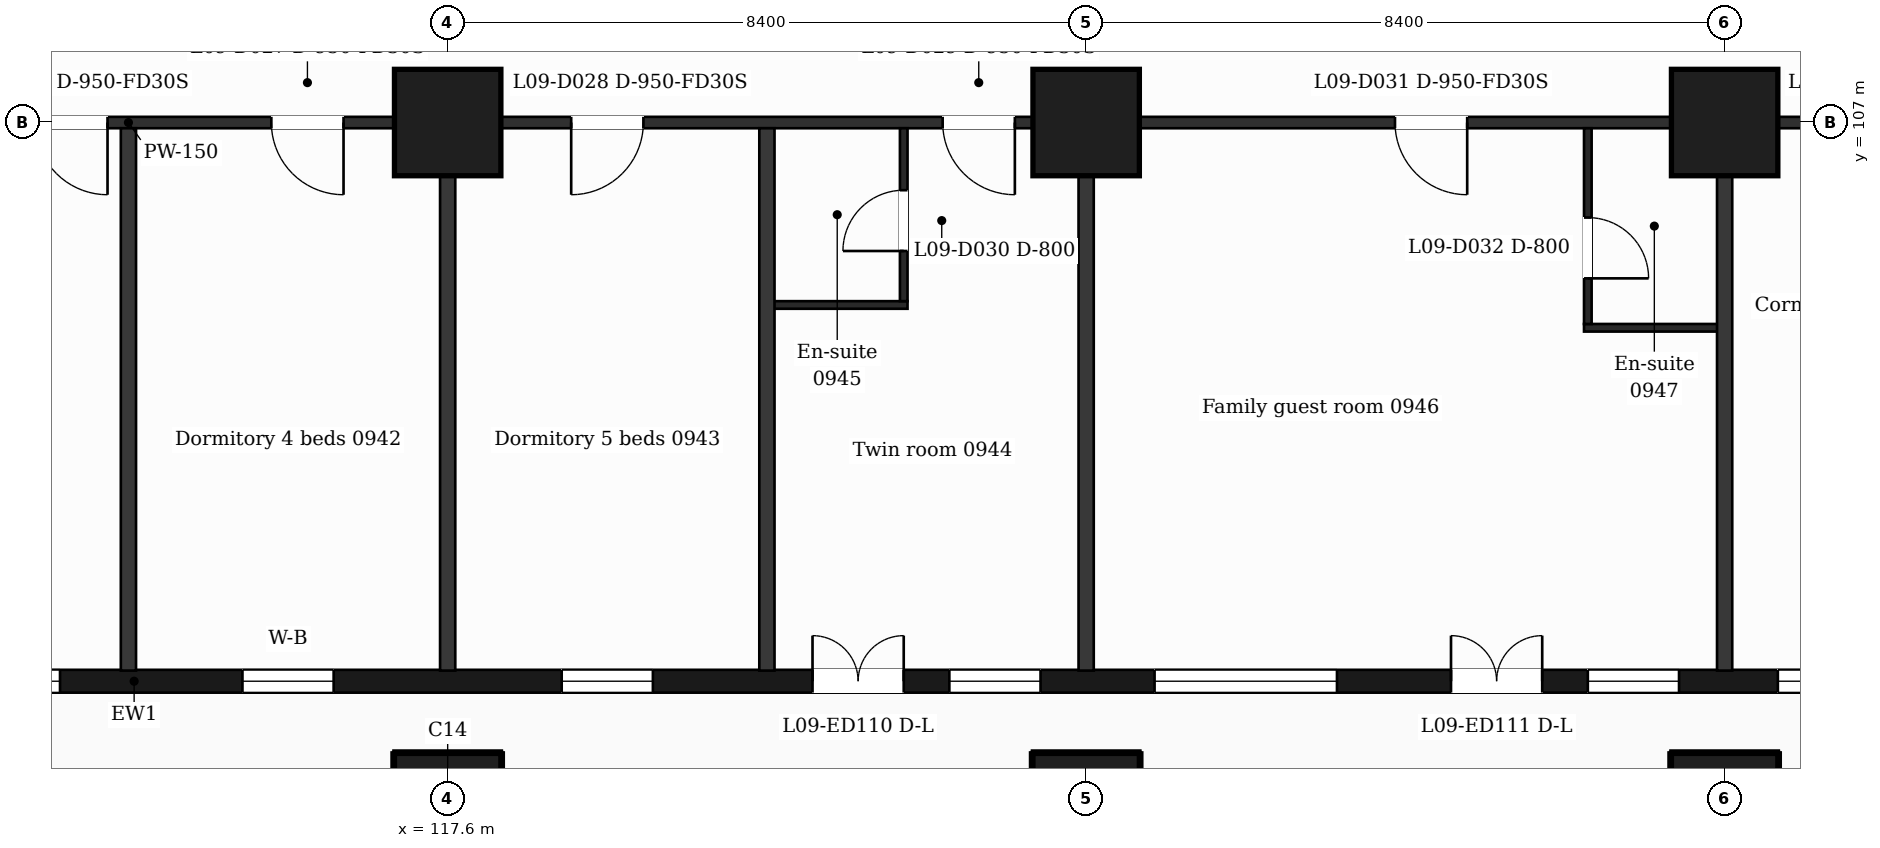
"""IFC4 building model, lengths in metres.
Left out: names, types, materials, properties, quantities, classifications, styles, units other than length and angle.
Written with IfcOpenShell. Run it as: python <this file> out.ifc"""

import sys

from ifc_helpers import new_model, si_unit, direction, frame, frame_2d, origin, origin_2d, place, context, subcontext, project, spatial, rectangle, extrude, element, fill, save


model = new_model("IFC4")
c1 = context("Model", 3, precision=1e-05, world=origin(), true_north=direction((0.0, 1.0)))
c2 = subcontext(c1, "Body", "Model", "MODEL_VIEW")
j1 = project(units=[si_unit("LENGTHUNIT", "METRE"), si_unit("PLANEANGLEUNIT", "RADIAN")], contexts=[c1])
p1 = place(None, origin())
s1 = spatial("IfcSite", under=j1, at=p1, CompositionType="ELEMENT")
p2 = place(p1, origin())
s2 = spatial("IfcBuilding", under=s1, at=p2, CompositionType="ELEMENT")
p3 = place(p2, frame((0.0, 0.0, 49.5)))
s3 = spatial("IfcBuildingStorey", under=s2, at=p3, CompositionType="ELEMENT", Elevation=49.5)
for number, where, z_axis, x_axis in (
    (1, (117.6, 98.0, 0.0), (0.0, 0.0, 1.0), (1.0, 0.0, 0.0)),
    (2, (126.0, 98.0, 0.0), (0.0, 0.0, 1.0), (1.0, 0.0, 0.0)),
    (3, (134.4, 98.0, 0.0), (0.0, 0.0, 1.0), (1.0, 0.0, 0.0)),
    (4, (117.6, 107.0, 0.0), (0.0, 0.0, 1.0), (1.0, 0.0, 0.0)),
    (5, (126.0, 107.0, 0.0), (0.0, 0.0, 1.0), (1.0, 0.0, 0.0)),
    (6, (134.4, 107.0, 0.0), (0.0, 0.0, 1.0), (1.0, 0.0, 0.0)),
):
    element("IfcColumn", number, at=place(p3, frame(where, z_axis=z_axis, x_axis=x_axis)), inside=s3, PredefinedType="COLUMN", context=c2, shape_type="SweptSolid", body=[
        extrude(rectangle(XDim=1.4, YDim=1.4, at=origin_2d()), origin(), (0.0, 0.0, 1.0), 3.5),
    ])
p4 = place(p3, frame((89.85, 99.65, 0.0), z_axis=(0.0, 0.0, 1.0), x_axis=(1.0, 0.0, 0.0)))
e7 = element("IfcWall", 7, at=p4, inside=s3, PredefinedType="SOLIDWALL", context=c2, shape_type="SweptSolid", body=[
    extrude(rectangle(XDim=47.25, YDim=0.3, at=frame_2d((23.625, 0.0))), origin(), (0.0, 0.0, 1.0), 3.18),
])
p5 = place(p4, frame((0.725, 0.0, 0.9)))
e8 = element("IfcOpeningElement", 8, at=p5, cuts=e7, PredefinedType="OPENING", context=c2, shape_type="SweptSolid", body=[
    extrude(rectangle(XDim=1.2, YDim=2.1, at=frame_2d((0.6, 1.05))), frame((0.0, 0.16, 0.0), z_axis=(0.0, -1.0, 0.0), x_axis=(1.0, 0.0, 0.0)), (0.0, 0.0, 1.0), 0.32),
])
p6 = place(p4, frame((3.45, 0.0, 0.9)))
e9 = element("IfcOpeningElement", 9, at=p6, cuts=e7, PredefinedType="OPENING", context=c2, shape_type="SweptSolid", body=[
    extrude(rectangle(XDim=2.4, YDim=2.1, at=frame_2d((1.2, 1.05))), frame((0.0, 0.16, 0.0), z_axis=(0.0, -1.0, 0.0), x_axis=(1.0, 0.0, 0.0)), (0.0, 0.0, 1.0), 0.32),
])
p7 = place(p4, frame((7.65, 0.0, 0.9)))
e10 = element("IfcOpeningElement", 10, at=p7, cuts=e7, PredefinedType="OPENING", context=c2, shape_type="SweptSolid", body=[
    extrude(rectangle(XDim=2.4, YDim=2.1, at=frame_2d((1.2, 1.05))), frame((0.0, 0.16, 0.0), z_axis=(0.0, -1.0, 0.0), x_axis=(1.0, 0.0, 0.0)), (0.0, 0.0, 1.0), 0.32),
])
p8 = place(p4, frame((11.85, 0.0, 0.9)))
e11 = element("IfcOpeningElement", 11, at=p8, cuts=e7, PredefinedType="OPENING", context=c2, shape_type="SweptSolid", body=[
    extrude(rectangle(XDim=2.4, YDim=2.1, at=frame_2d((1.2, 1.05))), frame((0.0, 0.16, 0.0), z_axis=(0.0, -1.0, 0.0), x_axis=(1.0, 0.0, 0.0)), (0.0, 0.0, 1.0), 0.32),
])
p9 = place(p4, frame((16.05, 0.0, 0.9)))
e12 = element("IfcOpeningElement", 12, at=p9, cuts=e7, PredefinedType="OPENING", context=c2, shape_type="SweptSolid", body=[
    extrude(rectangle(XDim=2.4, YDim=2.1, at=frame_2d((1.2, 1.05))), frame((0.0, 0.16, 0.0), z_axis=(0.0, -1.0, 0.0), x_axis=(1.0, 0.0, 0.0)), (0.0, 0.0, 1.0), 0.32),
])
p10 = place(p4, frame((20.25, 0.0, 0.9)))
e13 = element("IfcOpeningElement", 13, at=p10, cuts=e7, PredefinedType="OPENING", context=c2, shape_type="SweptSolid", body=[
    extrude(rectangle(XDim=2.4, YDim=2.1, at=frame_2d((1.2, 1.05))), frame((0.0, 0.16, 0.0), z_axis=(0.0, -1.0, 0.0), x_axis=(1.0, 0.0, 0.0)), (0.0, 0.0, 1.0), 0.32),
])
p11 = place(p4, frame((25.05, 0.0, 0.9)))
e14 = element("IfcOpeningElement", 14, at=p11, cuts=e7, PredefinedType="OPENING", context=c2, shape_type="SweptSolid", body=[
    extrude(rectangle(XDim=1.2, YDim=2.1, at=frame_2d((0.6, 1.05))), frame((0.0, 0.16, 0.0), z_axis=(0.0, -1.0, 0.0), x_axis=(1.0, 0.0, 0.0)), (0.0, 0.0, 1.0), 0.32),
])
p12 = place(p4, frame((29.25, 0.0, 0.9)))
e15 = element("IfcOpeningElement", 15, at=p12, cuts=e7, PredefinedType="OPENING", context=c2, shape_type="SweptSolid", body=[
    extrude(rectangle(XDim=1.2, YDim=2.1, at=frame_2d((0.6, 1.05))), frame((0.0, 0.16, 0.0), z_axis=(0.0, -1.0, 0.0), x_axis=(1.0, 0.0, 0.0)), (0.0, 0.0, 1.0), 0.32),
])
p13 = place(p4, frame((32.55, 0.0, 0.0)))
e16 = element("IfcOpeningElement", 16, at=p13, cuts=e7, PredefinedType="OPENING", context=c2, shape_type="SweptSolid", body=[
    extrude(rectangle(XDim=1.2, YDim=2.4, at=frame_2d((0.6, 1.2))), frame((0.0, 0.16, 0.0), z_axis=(0.0, -1.0, 0.0), x_axis=(1.0, 0.0, 0.0)), (0.0, 0.0, 1.0), 0.32),
])
p14 = place(p4, frame((34.35, 0.0, 0.9)))
e17 = element("IfcOpeningElement", 17, at=p14, cuts=e7, PredefinedType="OPENING", context=c2, shape_type="SweptSolid", body=[
    extrude(rectangle(XDim=1.2, YDim=2.1, at=frame_2d((0.6, 1.05))), frame((0.0, 0.16, 0.0), z_axis=(0.0, -1.0, 0.0), x_axis=(1.0, 0.0, 0.0)), (0.0, 0.0, 1.0), 0.32),
])
p15 = place(p4, frame((37.05, 0.0, 0.9)))
e18 = element("IfcOpeningElement", 18, at=p15, cuts=e7, PredefinedType="OPENING", context=c2, shape_type="SweptSolid", body=[
    extrude(rectangle(XDim=2.4, YDim=2.1, at=frame_2d((1.2, 1.05))), frame((0.0, 0.16, 0.0), z_axis=(0.0, -1.0, 0.0), x_axis=(1.0, 0.0, 0.0)), (0.0, 0.0, 1.0), 0.32),
])
p16 = place(p4, frame((40.95, 0.0, 0.0)))
e19 = element("IfcOpeningElement", 19, at=p16, cuts=e7, PredefinedType="OPENING", context=c2, shape_type="SweptSolid", body=[
    extrude(rectangle(XDim=1.2, YDim=2.4, at=frame_2d((0.6, 1.2))), frame((0.0, 0.16, 0.0), z_axis=(0.0, -1.0, 0.0), x_axis=(1.0, 0.0, 0.0)), (0.0, 0.0, 1.0), 0.32),
])
p17 = place(p4, frame((42.75, 0.0, 0.9)))
e20 = element("IfcOpeningElement", 20, at=p17, cuts=e7, PredefinedType="OPENING", context=c2, shape_type="SweptSolid", body=[
    extrude(rectangle(XDim=1.2, YDim=2.1, at=frame_2d((0.6, 1.05))), frame((0.0, 0.16, 0.0), z_axis=(0.0, -1.0, 0.0), x_axis=(1.0, 0.0, 0.0)), (0.0, 0.0, 1.0), 0.32),
])
p18 = place(p4, frame((45.25, 0.0, 0.9)))
e21 = element("IfcOpeningElement", 21, at=p18, cuts=e7, PredefinedType="OPENING", context=c2, shape_type="SweptSolid", body=[
    extrude(rectangle(XDim=1.2, YDim=2.1, at=frame_2d((0.6, 1.05))), frame((0.0, 0.16, 0.0), z_axis=(0.0, -1.0, 0.0), x_axis=(1.0, 0.0, 0.0)), (0.0, 0.0, 1.0), 0.32),
])
for number, where, z_axis, x_axis in (
    (22, (132.55, 104.3, 0.0), (0.0, 0.0, 1.0), (1.0, 0.0, 0.0)),
    (23, (121.8, 104.6, 0.0), (0.0, 0.0, 1.0), (1.0, 0.0, 0.0)),
):
    element("IfcWall", number, at=place(p3, frame(where, z_axis=z_axis, x_axis=x_axis)), inside=s3, PredefinedType="PARTITIONING", context=c2, shape_type="SweptSolid", body=[
        extrude(rectangle(XDim=1.85, YDim=0.1, at=frame_2d((0.925, 0.0))), origin(), (0.0, 0.0, 1.0), 3.18),
    ])
p19 = place(p3, frame((87.018, 107.0, 0.0), z_axis=(0.0, 0.0, 1.0), x_axis=(1.0, 0.0, 0.0)))
e24 = element("IfcWall", 24, at=p19, inside=s3, PredefinedType="PARTITIONING", context=c2, shape_type="SweptSolid", body=[
    extrude(rectangle(XDim=52.765, YDim=0.15, at=frame_2d((26.382, 0.0))), origin(), (0.0, 0.0, 1.0), 3.18),
])
p20 = place(p19, frame((0.87, 0.0, 0.0)))
e25 = element("IfcOpeningElement", 25, at=p20, cuts=e24, PredefinedType="OPENING", context=c2, shape_type="SweptSolid", body=[
    extrude(rectangle(XDim=0.95, YDim=2.1, at=frame_2d((0.475, 1.05))), frame((0.0, 0.085, 0.0), z_axis=(0.0, -1.0, 0.0), x_axis=(1.0, 0.0, 0.0)), (0.0, 0.0, 1.0), 0.17),
])
p21 = place(p19, frame((6.752, 0.0, 0.0)))
e26 = element("IfcOpeningElement", 26, at=p21, cuts=e24, PredefinedType="OPENING", context=c2, shape_type="SweptSolid", body=[
    extrude(rectangle(XDim=0.95, YDim=2.1, at=frame_2d((0.475, 1.05))), frame((0.0, 0.085, 0.0), z_axis=(0.0, -1.0, 0.0), x_axis=(1.0, 0.0, 0.0)), (0.0, 0.0, 1.0), 0.17),
])
p22 = place(p19, frame((9.857, 0.0, 0.0)))
e27 = element("IfcOpeningElement", 27, at=p22, cuts=e24, PredefinedType="OPENING", context=c2, shape_type="SweptSolid", body=[
    extrude(rectangle(XDim=0.95, YDim=2.1, at=frame_2d((0.475, 1.05))), frame((0.0, 0.085, 0.0), z_axis=(0.0, -1.0, 0.0), x_axis=(1.0, 0.0, 0.0)), (0.0, 0.0, 1.0), 0.17),
])
p23 = place(p19, frame((14.682, 0.0, 0.0)))
e28 = element("IfcOpeningElement", 28, at=p23, cuts=e24, PredefinedType="OPENING", context=c2, shape_type="SweptSolid", body=[
    extrude(rectangle(XDim=0.95, YDim=2.1, at=frame_2d((0.475, 1.05))), frame((0.0, 0.085, 0.0), z_axis=(0.0, -1.0, 0.0), x_axis=(1.0, 0.0, 0.0)), (0.0, 0.0, 1.0), 0.17),
])
p24 = place(p19, frame((19.862, 0.0, 0.0)))
e29 = element("IfcOpeningElement", 29, at=p24, cuts=e24, PredefinedType="OPENING", context=c2, shape_type="SweptSolid", body=[
    extrude(rectangle(XDim=0.95, YDim=2.1, at=frame_2d((0.475, 1.05))), frame((0.0, 0.085, 0.0), z_axis=(0.0, -1.0, 0.0), x_axis=(1.0, 0.0, 0.0)), (0.0, 0.0, 1.0), 0.17),
])
p25 = place(p19, frame((25.157, 0.0, 0.0)))
e30 = element("IfcOpeningElement", 30, at=p25, cuts=e24, PredefinedType="OPENING", context=c2, shape_type="SweptSolid", body=[
    extrude(rectangle(XDim=0.95, YDim=2.1, at=frame_2d((0.475, 1.05))), frame((0.0, 0.085, 0.0), z_axis=(0.0, -1.0, 0.0), x_axis=(1.0, 0.0, 0.0)), (0.0, 0.0, 1.0), 0.17),
])
p26 = place(p19, frame((28.262, 0.0, 0.0)))
e31 = element("IfcOpeningElement", 31, at=p26, cuts=e24, PredefinedType="OPENING", context=c2, shape_type="SweptSolid", body=[
    extrude(rectangle(XDim=0.95, YDim=2.1, at=frame_2d((0.475, 1.05))), frame((0.0, 0.085, 0.0), z_axis=(0.0, -1.0, 0.0), x_axis=(1.0, 0.0, 0.0)), (0.0, 0.0, 1.0), 0.17),
])
p27 = place(p19, frame((32.207, 0.0, 0.0)))
e32 = element("IfcOpeningElement", 32, at=p27, cuts=e24, PredefinedType="OPENING", context=c2, shape_type="SweptSolid", body=[
    extrude(rectangle(XDim=0.95, YDim=2.1, at=frame_2d((0.475, 1.05))), frame((0.0, 0.085, 0.0), z_axis=(0.0, -1.0, 0.0), x_axis=(1.0, 0.0, 0.0)), (0.0, 0.0, 1.0), 0.17),
])
p28 = place(p19, frame((37.094, 0.0, 0.0)))
e33 = element("IfcOpeningElement", 33, at=p28, cuts=e24, PredefinedType="OPENING", context=c2, shape_type="SweptSolid", body=[
    extrude(rectangle(XDim=0.95, YDim=2.1, at=frame_2d((0.475, 1.05))), frame((0.0, 0.085, 0.0), z_axis=(0.0, -1.0, 0.0), x_axis=(1.0, 0.0, 0.0)), (0.0, 0.0, 1.0), 0.17),
])
p29 = place(p19, frame((43.045, 0.0, 0.0)))
e34 = element("IfcOpeningElement", 34, at=p29, cuts=e24, PredefinedType="OPENING", context=c2, shape_type="SweptSolid", body=[
    extrude(rectangle(XDim=0.95, YDim=2.1, at=frame_2d((0.475, 1.05))), frame((0.0, 0.085, 0.0), z_axis=(0.0, -1.0, 0.0), x_axis=(1.0, 0.0, 0.0)), (0.0, 0.0, 1.0), 0.17),
])
p30 = place(p19, frame((49.285, 0.0, 0.0)))
e35 = element("IfcOpeningElement", 35, at=p30, cuts=e24, PredefinedType="OPENING", context=c2, shape_type="SweptSolid", body=[
    extrude(rectangle(XDim=0.95, YDim=2.1, at=frame_2d((0.475, 1.05))), frame((0.0, 0.085, 0.0), z_axis=(0.0, -1.0, 0.0), x_axis=(1.0, 0.0, 0.0)), (0.0, 0.0, 1.0), 0.17),
])
for number, where, z_axis, x_axis in (
    (36, (113.4, 99.79, 0.0), (0.0, 0.0, 1.0), (0.0, 1.0, 0.0)),
    (37, (117.6, 99.79, 0.0), (0.0, 0.0, 1.0), (0.0, 1.0, 0.0)),
    (38, (121.8, 99.79, 0.0), (0.0, 0.0, 1.0), (0.0, 1.0, 0.0)),
):
    element("IfcWall", number, at=place(p3, frame(where, z_axis=z_axis, x_axis=x_axis)), inside=s3, PredefinedType="PARTITIONING", context=c2, shape_type="SweptSolid", body=[
        extrude(rectangle(XDim=7.135, YDim=0.2, at=frame_2d((3.567, 0.0))), origin(), (0.0, 0.0, 1.0), 3.18),
    ])
p31 = place(p3, frame((123.6, 104.65, 0.0), z_axis=(0.0, 0.0, 1.0), x_axis=(0.0, 1.0, 0.0)))
e39 = element("IfcWall", 39, at=p31, inside=s3, PredefinedType="PARTITIONING", context=c2, shape_type="SweptSolid", body=[
    extrude(rectangle(XDim=2.275, YDim=0.1, at=frame_2d((1.138, 0.0))), origin(), (0.0, 0.0, 1.0), 3.18),
])
p32 = place(p31, frame((0.66, 0.0, 0.0)))
e40 = element("IfcOpeningElement", 40, at=p32, cuts=e39, PredefinedType="OPENING", context=c2, shape_type="SweptSolid", body=[
    extrude(rectangle(XDim=0.8, YDim=2.1, at=frame_2d((0.4, 1.05))), frame((0.0, 0.06, 0.0), z_axis=(0.0, -1.0, 0.0), x_axis=(1.0, 0.0, 0.0)), (0.0, 0.0, 1.0), 0.12),
])
p33 = place(p3, frame((126.0, 99.79, 0.0), z_axis=(0.0, 0.0, 1.0), x_axis=(0.0, 1.0, 0.0)))
e41 = element("IfcWall", 41, at=p33, inside=s3, PredefinedType="PARTITIONING", context=c2, shape_type="SweptSolid", body=[
    extrude(rectangle(XDim=7.135, YDim=0.2, at=frame_2d((3.567, 0.0))), origin(), (0.0, 0.0, 1.0), 3.18),
])
p34 = place(p3, frame((132.6, 104.35, 0.0), z_axis=(0.0, 0.0, 1.0), x_axis=(0.0, 1.0, 0.0)))
e42 = element("IfcWall", 42, at=p34, inside=s3, PredefinedType="PARTITIONING", context=c2, shape_type="SweptSolid", body=[
    extrude(rectangle(XDim=2.575, YDim=0.1, at=frame_2d((1.288, 0.0))), origin(), (0.0, 0.0, 1.0), 3.18),
])
p35 = place(p34, frame((0.6, 0.0, 0.0)))
e43 = element("IfcOpeningElement", 43, at=p35, cuts=e42, PredefinedType="OPENING", context=c2, shape_type="SweptSolid", body=[
    extrude(rectangle(XDim=0.8, YDim=2.1, at=frame_2d((0.4, 1.05))), frame((0.0, 0.06, 0.0), z_axis=(0.0, -1.0, 0.0), x_axis=(1.0, 0.0, 0.0)), (0.0, 0.0, 1.0), 0.12),
])
p36 = place(p3, frame((134.4, 99.79, 0.0), z_axis=(0.0, 0.0, 1.0), x_axis=(0.0, 1.0, 0.0)))
e44 = element("IfcWall", 44, at=p36, inside=s3, PredefinedType="PARTITIONING", context=c2, shape_type="SweptSolid", body=[
    extrude(rectangle(XDim=7.135, YDim=0.2, at=frame_2d((3.567, 0.0))), origin(), (0.0, 0.0, 1.0), 3.18),
])
p37 = place(p10, origin())
e45 = element("IfcWindow", 45, at=p37, inside=s3, PartitioningType="SINGLE_PANEL", PredefinedType="WINDOW", context=c2, shape_type="SweptSolid", body=[
    extrude(rectangle(XDim=2.4, YDim=2.1, at=frame_2d((1.2, 1.05))), frame((0.0, 0.03, 0.0), z_axis=(0.0, -1.0, 0.0), x_axis=(1.0, 0.0, 0.0)), (0.0, 0.0, 1.0), 0.06),
])
fill(e13, e45)
p38 = place(p11, origin())
e46 = element("IfcWindow", 46, at=p38, inside=s3, PartitioningType="SINGLE_PANEL", PredefinedType="WINDOW", context=c2, shape_type="SweptSolid", body=[
    extrude(rectangle(XDim=1.2, YDim=2.1, at=frame_2d((0.6, 1.05))), frame((0.0, 0.03, 0.0), z_axis=(0.0, -1.0, 0.0), x_axis=(1.0, 0.0, 0.0)), (0.0, 0.0, 1.0), 0.06),
])
fill(e14, e46)
p39 = place(p12, origin())
e47 = element("IfcWindow", 47, at=p39, inside=s3, PartitioningType="SINGLE_PANEL", PredefinedType="WINDOW", context=c2, shape_type="SweptSolid", body=[
    extrude(rectangle(XDim=1.2, YDim=2.1, at=frame_2d((0.6, 1.05))), frame((0.0, 0.03, 0.0), z_axis=(0.0, -1.0, 0.0), x_axis=(1.0, 0.0, 0.0)), (0.0, 0.0, 1.0), 0.06),
])
fill(e15, e47)
p40 = place(p13, origin())
e48 = element("IfcDoor", 48, at=p40, inside=s3, OperationType="DOUBLE_DOOR_SINGLE_SWING", PredefinedType="DOOR", context=c2, shape_type="SweptSolid", body=[
    extrude(rectangle(XDim=1.2, YDim=2.4, at=frame_2d((0.6, 1.2))), frame((0.0, 0.025, 0.0), z_axis=(0.0, -1.0, 0.0), x_axis=(1.0, 0.0, 0.0)), (0.0, 0.0, 1.0), 0.05),
])
fill(e16, e48)
p41 = place(p14, origin())
e49 = element("IfcWindow", 49, at=p41, inside=s3, PartitioningType="SINGLE_PANEL", PredefinedType="WINDOW", context=c2, shape_type="SweptSolid", body=[
    extrude(rectangle(XDim=1.2, YDim=2.1, at=frame_2d((0.6, 1.05))), frame((0.0, 0.03, 0.0), z_axis=(0.0, -1.0, 0.0), x_axis=(1.0, 0.0, 0.0)), (0.0, 0.0, 1.0), 0.06),
])
fill(e17, e49)
p42 = place(p15, origin())
e50 = element("IfcWindow", 50, at=p42, inside=s3, PartitioningType="SINGLE_PANEL", PredefinedType="WINDOW", context=c2, shape_type="SweptSolid", body=[
    extrude(rectangle(XDim=2.4, YDim=2.1, at=frame_2d((1.2, 1.05))), frame((0.0, 0.03, 0.0), z_axis=(0.0, -1.0, 0.0), x_axis=(1.0, 0.0, 0.0)), (0.0, 0.0, 1.0), 0.06),
])
fill(e18, e50)
p43 = place(p16, origin())
e51 = element("IfcDoor", 51, at=p43, inside=s3, OperationType="DOUBLE_DOOR_SINGLE_SWING", PredefinedType="DOOR", context=c2, shape_type="SweptSolid", body=[
    extrude(rectangle(XDim=1.2, YDim=2.4, at=frame_2d((0.6, 1.2))), frame((0.0, 0.025, 0.0), z_axis=(0.0, -1.0, 0.0), x_axis=(1.0, 0.0, 0.0)), (0.0, 0.0, 1.0), 0.05),
])
fill(e19, e51)
p44 = place(p17, origin())
e52 = element("IfcWindow", 52, at=p44, inside=s3, PartitioningType="SINGLE_PANEL", PredefinedType="WINDOW", context=c2, shape_type="SweptSolid", body=[
    extrude(rectangle(XDim=1.2, YDim=2.1, at=frame_2d((0.6, 1.05))), frame((0.0, 0.03, 0.0), z_axis=(0.0, -1.0, 0.0), x_axis=(1.0, 0.0, 0.0)), (0.0, 0.0, 1.0), 0.06),
])
fill(e20, e52)
p45 = place(p18, origin())
e53 = element("IfcWindow", 53, at=p45, inside=s3, PartitioningType="SINGLE_PANEL", PredefinedType="WINDOW", context=c2, shape_type="SweptSolid", body=[
    extrude(rectangle(XDim=1.2, YDim=2.1, at=frame_2d((0.6, 1.05))), frame((0.0, 0.03, 0.0), z_axis=(0.0, -1.0, 0.0), x_axis=(1.0, 0.0, 0.0)), (0.0, 0.0, 1.0), 0.06),
])
fill(e21, e53)
p46 = place(p25, origin())
e54 = element("IfcDoor", 54, at=p46, inside=s3, OperationType="SINGLE_SWING_RIGHT", PredefinedType="DOOR", context=c2, shape_type="SweptSolid", body=[
    extrude(rectangle(XDim=0.95, YDim=2.1, at=frame_2d((0.475, 1.05))), frame((0.0, 0.025, 0.0), z_axis=(0.0, -1.0, 0.0), x_axis=(1.0, 0.0, 0.0)), (0.0, 0.0, 1.0), 0.05),
])
fill(e30, e54)
p47 = place(p26, origin())
e55 = element("IfcDoor", 55, at=p47, inside=s3, OperationType="SINGLE_SWING_RIGHT", PredefinedType="DOOR", context=c2, shape_type="SweptSolid", body=[
    extrude(rectangle(XDim=0.95, YDim=2.1, at=frame_2d((0.475, 1.05))), frame((0.0, 0.025, 0.0), z_axis=(0.0, -1.0, 0.0), x_axis=(1.0, 0.0, 0.0)), (0.0, 0.0, 1.0), 0.05),
])
fill(e31, e55)
p48 = place(p27, origin())
e56 = element("IfcDoor", 56, at=p48, inside=s3, OperationType="SINGLE_SWING_LEFT", PredefinedType="DOOR", context=c2, shape_type="SweptSolid", body=[
    extrude(rectangle(XDim=0.95, YDim=2.1, at=frame_2d((0.475, 1.05))), frame((0.0, 0.025, 0.0), z_axis=(0.0, -1.0, 0.0), x_axis=(1.0, 0.0, 0.0)), (0.0, 0.0, 1.0), 0.05),
])
fill(e32, e56)
p49 = place(p28, origin())
e57 = element("IfcDoor", 57, at=p49, inside=s3, OperationType="SINGLE_SWING_RIGHT", PredefinedType="DOOR", context=c2, shape_type="SweptSolid", body=[
    extrude(rectangle(XDim=0.95, YDim=2.1, at=frame_2d((0.475, 1.05))), frame((0.0, 0.025, 0.0), z_axis=(0.0, -1.0, 0.0), x_axis=(1.0, 0.0, 0.0)), (0.0, 0.0, 1.0), 0.05),
])
fill(e33, e57)
p50 = place(p32, origin())
e58 = element("IfcDoor", 58, at=p50, inside=s3, OperationType="SINGLE_SWING_LEFT", PredefinedType="DOOR", context=c2, shape_type="SweptSolid", body=[
    extrude(rectangle(XDim=0.8, YDim=2.1, at=frame_2d((0.4, 1.05))), frame((0.0, 0.025, 0.0), z_axis=(0.0, -1.0, 0.0), x_axis=(1.0, 0.0, 0.0)), (0.0, 0.0, 1.0), 0.05),
])
fill(e40, e58)
p51 = place(p29, origin())
e59 = element("IfcDoor", 59, at=p51, inside=s3, OperationType="SINGLE_SWING_RIGHT", PredefinedType="DOOR", context=c2, shape_type="SweptSolid", body=[
    extrude(rectangle(XDim=0.95, YDim=2.1, at=frame_2d((0.475, 1.05))), frame((0.0, 0.025, 0.0), z_axis=(0.0, -1.0, 0.0), x_axis=(1.0, 0.0, 0.0)), (0.0, 0.0, 1.0), 0.05),
])
fill(e34, e59)
p52 = place(p35, origin())
e60 = element("IfcDoor", 60, at=p52, inside=s3, OperationType="SINGLE_SWING_LEFT", PredefinedType="DOOR", context=c2, shape_type="SweptSolid", body=[
    extrude(rectangle(XDim=0.8, YDim=2.1, at=frame_2d((0.4, 1.05))), frame((0.0, 0.025, 0.0), z_axis=(0.0, -1.0, 0.0), x_axis=(1.0, 0.0, 0.0)), (0.0, 0.0, 1.0), 0.05),
])
fill(e43, e60)
save(model, sys.argv[1])
